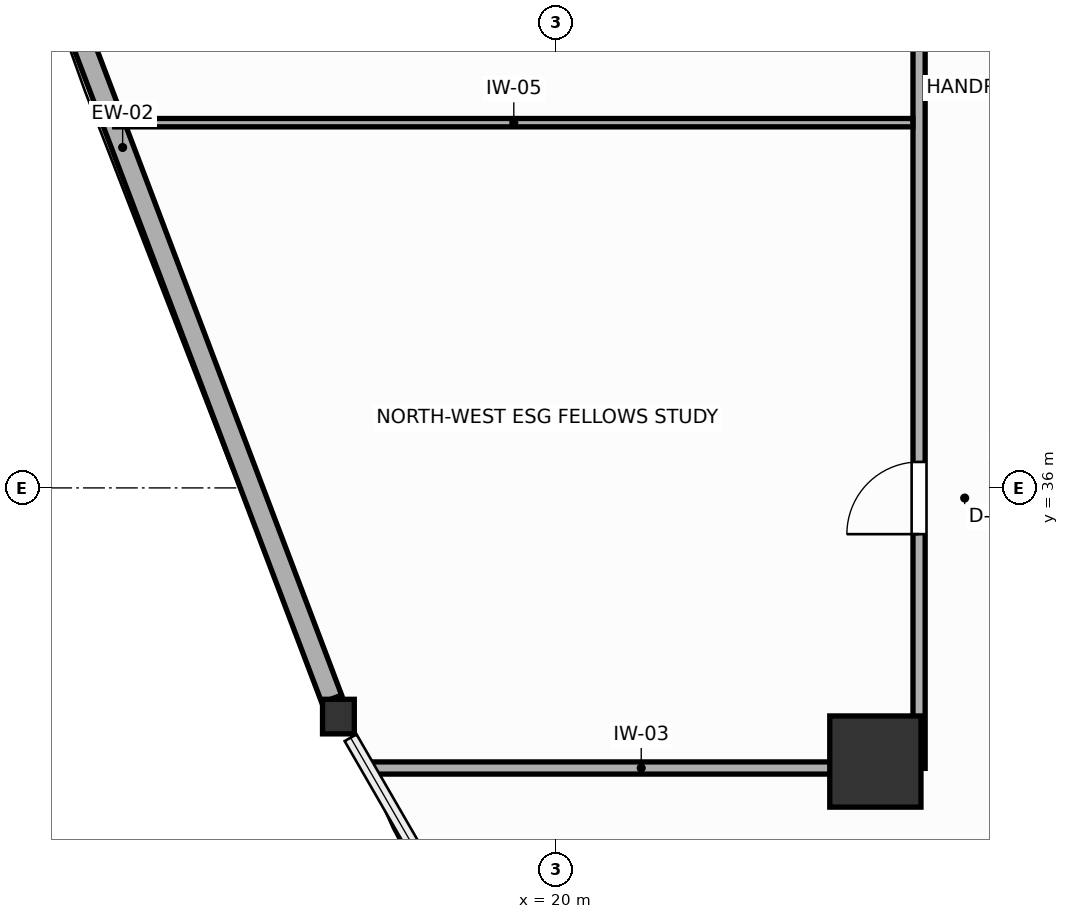
"""IFC4 building model, lengths in metres.
Left out: names, types, materials, properties, quantities, classifications, styles, units other than length and angle.
Written with IfcOpenShell. Run it as: python <this file> out.ifc"""

import sys

from ifc_helpers import new_model, si_unit, direction, frame, frame_2d, origin, origin_2d, place, context, subcontext, project, spatial, rectangle, i_section, extrude, source, transform, mapped, element, fill, save


model = new_model("IFC4")
c1 = context("Model", 3, precision=1e-05, world=origin(), true_north=direction((0.0, 1.0)))
c2 = subcontext(c1, "Body", "Model", "MODEL_VIEW")
j1 = project(units=[si_unit("LENGTHUNIT", "METRE"), si_unit("PLANEANGLEUNIT", "RADIAN")], contexts=[c1])
p1 = place(None, origin())
s1 = spatial("IfcSite", under=j1, at=p1, CompositionType="ELEMENT")
p2 = place(p1, origin())
s2 = spatial("IfcBuilding", under=s1, at=p2, CompositionType="ELEMENT")
p3 = place(p2, frame((0.0, 0.0, 120.6)))
s3 = spatial("IfcBuildingStorey", under=s2, at=p3, CompositionType="ELEMENT", Elevation=120.6)
m1 = source(origin(), c2, "Body", "SweptSolid", [
    extrude(rectangle(XDim=1.2, YDim=1.2, at=origin_2d()), origin(), (0.0, 0.0, 1.0), 3.6),
])
p4 = place(p3, frame((24.2, 32.4, 0.0), z_axis=(0.0, 0.0, 1.0), x_axis=(1.0, 0.0, 0.0)))
e1 = element("IfcColumn", 1, at=p4, inside=s3, PredefinedType="COLUMN", context=c2, shape_type="MappedRepresentation", body=[
    mapped(m1, transform((0.0, 0.0, 0.0), scale=1.0)),
])
m2 = source(origin(), c2, "Body", "SweptSolid", [
    extrude(i_section(OverallWidth=0.418, OverallDepth=0.455, WebThickness=0.039, FlangeThickness=0.063, FilletRadius=0.015, at=origin_2d()), origin(), (0.0, 0.0, 1.0), 3.6),
])
p5 = place(p3, frame((17.136, 32.991, 0.0), z_axis=(0.0, 0.0, 1.0), x_axis=(1.0, 0.0, 0.0)))
e2 = element("IfcColumn", 2, at=p5, inside=s3, PredefinedType="COLUMN", context=c2, shape_type="MappedRepresentation", body=[
    mapped(m2, transform((0.0, 0.0, 0.0), scale=1.0)),
])
p6 = place(p3, frame((11.546, 47.734, 0.0), z_axis=(0.0, 0.0, 1.0), x_axis=(0.354519532047, -0.935048609109, 0.0)))
e3 = element("IfcWall", 3, at=p6, inside=s3, PredefinedType="SOLIDWALL", context=c2, shape_type="SweptSolid", body=[
    extrude(rectangle(XDim=15.517, YDim=0.28, at=frame_2d((7.759, 0.0))), origin(), (0.0, 0.0, 1.0), 2.95),
])
p7 = place(p3, frame((24.775, 32.31, 0.0), z_axis=(0.0, 0.0, 1.0), x_axis=(0.0, 1.0, 0.0)))
e4 = element("IfcWall", 4, at=p7, inside=s3, PredefinedType="PARTITIONING", context=c2, shape_type="SweptSolid", body=[
    extrude(rectangle(XDim=20.796, YDim=0.16, at=frame_2d((10.398, 0.0))), origin(), (0.0, 0.0, 1.0), 3.4),
])
p8 = place(p7, frame((3.082, 0.0, 0.0)))
e5 = element("IfcOpeningElement", 5, at=p8, cuts=e4, PredefinedType="OPENING", context=c2, shape_type="SweptSolid", body=[
    extrude(rectangle(XDim=0.95, YDim=2.05, at=frame_2d((0.475, 1.025))), frame((0.0, 0.09, 0.0), z_axis=(0.0, -1.0, 0.0), x_axis=(1.0, 0.0, 0.0)), (0.0, 0.0, 1.0), 0.18),
])
p9 = place(p7, frame((11.46, 0.0, 0.0)))
e6 = element("IfcOpeningElement", 6, at=p9, cuts=e4, PredefinedType="OPENING", context=c2, shape_type="SweptSolid", body=[
    extrude(rectangle(XDim=0.95, YDim=2.05, at=frame_2d((0.475, 1.025))), frame((0.0, 0.09, 0.0), z_axis=(0.0, -1.0, 0.0), x_axis=(1.0, 0.0, 0.0)), (0.0, 0.0, 1.0), 0.18),
])
p10 = place(p3, frame((17.546, 32.315, 0.0), z_axis=(0.0, 0.0, 1.0), x_axis=(1.0, 0.0, 0.0)))
e7 = element("IfcWall", 7, at=p10, inside=s3, PredefinedType="PARTITIONING", context=c2, shape_type="SweptSolid", body=[
    extrude(rectangle(XDim=7.147, YDim=0.16, at=frame_2d((3.573, 0.0))), origin(), (0.0, 0.0, 1.0), 2.95),
])
p11 = place(p3, frame((14.193, 40.805, 0.0), z_axis=(0.0, 0.0, 1.0), x_axis=(1.0, 0.0, 0.0)))
e8 = element("IfcWall", 8, at=p11, inside=s3, PredefinedType="MOVABLE", context=c2, shape_type="SweptSolid", body=[
    extrude(rectangle(XDim=10.5, YDim=0.11, at=frame_2d((5.25, 0.0))), origin(), (0.0, 0.0, 1.0), 3.4),
])
p12 = place(p8, origin())
e9 = element("IfcDoor", 9, at=p12, inside=s3, OperationType="SINGLE_SWING_LEFT", PredefinedType="DOOR", context=c2, shape_type="SweptSolid", body=[
    extrude(rectangle(XDim=0.95, YDim=2.05, at=frame_2d((0.475, 1.025))), frame((0.0, 0.025, 0.0), z_axis=(0.0, -1.0, 0.0), x_axis=(1.0, 0.0, 0.0)), (0.0, 0.0, 1.0), 0.05),
])
fill(e5, e9)
save(model, sys.argv[1])
